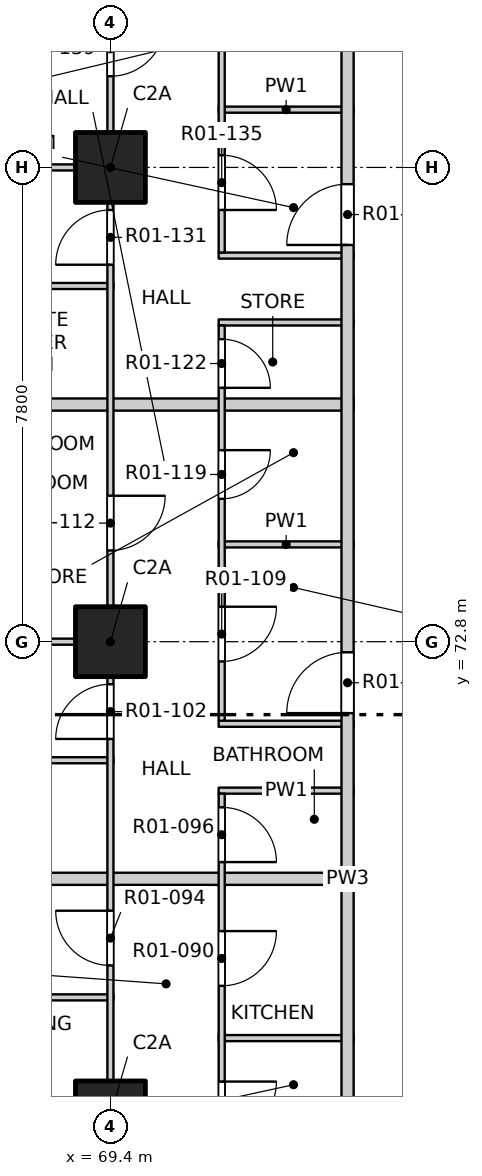
"""IFC4 building model, lengths in metres.
Left out: names, types, materials, properties, quantities, classifications, styles, units other than length and angle.
Written with IfcOpenShell. Run it as: python <this file> out.ifc"""

import sys

from ifc_helpers import new_model, si_unit, direction, frame, frame_2d, origin, origin_2d, place, context, subcontext, project, spatial, rectangle, extrude, element, fill, save


model = new_model("IFC4")
c1 = context("Model", 3, precision=1e-05, world=origin(), true_north=direction((0.0, 1.0)))
c2 = subcontext(c1, "Body", "Model", "MODEL_VIEW")
j1 = project(units=[si_unit("LENGTHUNIT", "METRE"), si_unit("PLANEANGLEUNIT", "RADIAN")], contexts=[c1])
p1 = place(None, origin())
s1 = spatial("IfcSite", under=j1, at=p1, CompositionType="ELEMENT")
p2 = place(p1, origin())
s2 = spatial("IfcBuilding", under=s1, at=p2, CompositionType="ELEMENT")
p3 = place(p2, frame((0.0, 0.0, 19.5)))
s3 = spatial("IfcBuildingStorey", under=s2, at=p3, CompositionType="ELEMENT", Elevation=19.5)
for number, where, z_axis, x_axis in (
    (1, (69.4, 65.0, -0.25), (0.0, 0.0, 1.0), (1.0, 0.0, 0.0)),
    (2, (69.4, 72.8, -0.25), (0.0, 0.0, 1.0), (1.0, 0.0, 0.0)),
    (3, (69.4, 80.6, -0.25), (0.0, 0.0, 1.0), (1.0, 0.0, 0.0)),
):
    element("IfcColumn", number, at=place(p3, frame(where, z_axis=z_axis, x_axis=x_axis)), inside=s3, PredefinedType="COLUMN", context=c2, shape_type="SweptSolid", body=[
        extrude(rectangle(XDim=1.15, YDim=1.15, at=origin_2d()), origin(), (0.0, 0.0, 1.0), 3.4),
    ])
p4 = place(p3, frame((71.18, 66.28, 0.0), z_axis=(0.0, 0.0, 1.0), x_axis=(1.0, 0.0, 0.0)))
e4 = element("IfcWall", 4, at=p4, inside=s3, PredefinedType="PARTITIONING", context=c2, shape_type="SweptSolid", body=[
    extrude(rectangle(XDim=2.22, YDim=0.1, at=frame_2d((1.11, 0.0))), origin(), (0.0, 0.0, 1.0), 3.15),
])
p5 = place(p3, frame((66.05, 66.95, 0.0), z_axis=(0.0, 0.0, 1.0), x_axis=(1.0, 0.0, 0.0)))
e5 = element("IfcWall", 5, at=p5, inside=s3, PredefinedType="PARTITIONING", context=c2, shape_type="SweptSolid", body=[
    extrude(rectangle(XDim=3.4, YDim=0.1, at=frame_2d((1.7, 0.0))), origin(), (0.0, 0.0, 1.0), 3.15),
])
p6 = place(p3, frame((61.9, 68.9, 0.0), z_axis=(0.0, 0.0, 1.0), x_axis=(1.0, 0.0, 0.0)))
e6 = element("IfcWall", 6, at=p6, inside=s3, PredefinedType="PARTITIONING", context=c2, shape_type="SweptSolid", body=[
    extrude(rectangle(XDim=11.5, YDim=0.2, at=frame_2d((5.75, 0.0))), origin(), (0.0, 0.0, 1.0), 3.15),
])
p7 = place(p3, frame((71.18, 70.35, 0.0), z_axis=(0.0, 0.0, 1.0), x_axis=(1.0, 0.0, 0.0)))
e7 = element("IfcWall", 7, at=p7, inside=s3, PredefinedType="PARTITIONING", context=c2, shape_type="SweptSolid", body=[
    extrude(rectangle(XDim=2.22, YDim=0.1, at=frame_2d((1.11, 0.0))), origin(), (0.0, 0.0, 1.0), 3.15),
])
p8 = place(p3, frame((65.75, 70.85, 0.0), z_axis=(0.0, 0.0, 1.0), x_axis=(1.0, 0.0, 0.0)))
e8 = element("IfcWall", 8, at=p8, inside=s3, PredefinedType="PARTITIONING", context=c2, shape_type="SweptSolid", body=[
    extrude(rectangle(XDim=3.7, YDim=0.1, at=frame_2d((1.85, 0.0))), origin(), (0.0, 0.0, 1.0), 3.15),
])
p9 = place(p3, frame((71.18, 71.45, 0.0), z_axis=(0.0, 0.0, 1.0), x_axis=(1.0, 0.0, 0.0)))
e9 = element("IfcWall", 9, at=p9, inside=s3, PredefinedType="PARTITIONING", context=c2, shape_type="SweptSolid", body=[
    extrude(rectangle(XDim=2.22, YDim=0.1, at=frame_2d((1.11, 0.0))), origin(), (0.0, 0.0, 1.0), 3.15),
])
p10 = place(p3, frame((61.9, 72.8, 0.0), z_axis=(0.0, 0.0, 1.0), x_axis=(1.0, 0.0, 0.0)))
e10 = element("IfcWall", 10, at=p10, inside=s3, PredefinedType="PARTITIONING", context=c2, shape_type="SweptSolid", body=[
    extrude(rectangle(XDim=7.55, YDim=0.1, at=frame_2d((3.775, 0.0))), origin(), (0.0, 0.0, 1.0), 2.55),
])
p11 = place(p3, frame((71.18, 74.4, 0.0), z_axis=(0.0, 0.0, 1.0), x_axis=(1.0, 0.0, 0.0)))
e11 = element("IfcWall", 11, at=p11, inside=s3, PredefinedType="PARTITIONING", context=c2, shape_type="SweptSolid", body=[
    extrude(rectangle(XDim=2.22, YDim=0.1, at=frame_2d((1.11, 0.0))), origin(), (0.0, 0.0, 1.0), 3.15),
])
p12 = place(p3, frame((61.9, 76.7, 0.0), z_axis=(0.0, 0.0, 1.0), x_axis=(1.0, 0.0, 0.0)))
e12 = element("IfcWall", 12, at=p12, inside=s3, PredefinedType="PARTITIONING", context=c2, shape_type="SweptSolid", body=[
    extrude(rectangle(XDim=11.5, YDim=0.2, at=frame_2d((5.75, 0.0))), origin(), (0.0, 0.0, 1.0), 3.15),
])
p13 = place(p3, frame((71.18, 78.05, 0.0), z_axis=(0.0, 0.0, 1.0), x_axis=(1.0, 0.0, 0.0)))
e13 = element("IfcWall", 13, at=p13, inside=s3, PredefinedType="PARTITIONING", context=c2, shape_type="SweptSolid", body=[
    extrude(rectangle(XDim=2.22, YDim=0.1, at=frame_2d((1.11, 0.0))), origin(), (0.0, 0.0, 1.0), 3.15),
])
p14 = place(p3, frame((65.9, 78.65, 0.0), z_axis=(0.0, 0.0, 1.0), x_axis=(1.0, 0.0, 0.0)))
e14 = element("IfcWall", 14, at=p14, inside=s3, PredefinedType="PARTITIONING", context=c2, shape_type="SweptSolid", body=[
    extrude(rectangle(XDim=3.55, YDim=0.1, at=frame_2d((1.775, 0.0))), origin(), (0.0, 0.0, 1.0), 3.15),
])
p15 = place(p3, frame((71.18, 79.15, 0.0), z_axis=(0.0, 0.0, 1.0), x_axis=(1.0, 0.0, 0.0)))
e15 = element("IfcWall", 15, at=p15, inside=s3, PredefinedType="PARTITIONING", context=c2, shape_type="SweptSolid", body=[
    extrude(rectangle(XDim=2.22, YDim=0.1, at=frame_2d((1.11, 0.0))), origin(), (0.0, 0.0, 1.0), 3.15),
])
p16 = place(p3, frame((61.9, 80.6, 0.0), z_axis=(0.0, 0.0, 1.0), x_axis=(1.0, 0.0, 0.0)))
e16 = element("IfcWall", 16, at=p16, inside=s3, PredefinedType="PARTITIONING", context=c2, shape_type="SweptSolid", body=[
    extrude(rectangle(XDim=7.55, YDim=0.1, at=frame_2d((3.775, 0.0))), origin(), (0.0, 0.0, 1.0), 2.55),
])
p17 = place(p3, frame((71.18, 81.55, 0.0), z_axis=(0.0, 0.0, 1.0), x_axis=(1.0, 0.0, 0.0)))
e17 = element("IfcWall", 17, at=p17, inside=s3, PredefinedType="PARTITIONING", context=c2, shape_type="SweptSolid", body=[
    extrude(rectangle(XDim=2.22, YDim=0.1, at=frame_2d((1.11, 0.0))), origin(), (0.0, 0.0, 1.0), 3.15),
])
p18 = place(p3, frame((69.4, 49.4, 0.0), z_axis=(0.0, 0.0, 1.0), x_axis=(0.0, 1.0, 0.0)))
e18 = element("IfcWall", 18, at=p18, inside=s3, PredefinedType="PARTITIONING", context=c2, shape_type="SweptSolid", body=[
    extrude(rectangle(XDim=31.2, YDim=0.1, at=frame_2d((15.6, 0.0))), origin(), (0.0, 0.0, 1.0), 3.15),
])
p19 = place(p18, frame((1.5, 0.0, 0.0)))
e19 = element("IfcOpeningElement", 19, at=p19, cuts=e18, PredefinedType="OPENING", context=c2, shape_type="SweptSolid", body=[
    extrude(rectangle(XDim=0.9, YDim=2.1, at=frame_2d((0.45, 1.05))), frame((0.0, 0.06, 0.0), z_axis=(0.0, -1.0, 0.0), x_axis=(1.0, 0.0, 0.0)), (0.0, 0.0, 1.0), 0.12),
])
p20 = place(p18, frame((6.225, 0.0, 0.0)))
e20 = element("IfcOpeningElement", 20, at=p20, cuts=e18, PredefinedType="OPENING", context=c2, shape_type="SweptSolid", body=[
    extrude(rectangle(XDim=0.9, YDim=2.1, at=frame_2d((0.45, 1.05))), frame((0.0, 0.06, 0.0), z_axis=(0.0, -1.0, 0.0), x_axis=(1.0, 0.0, 0.0)), (0.0, 0.0, 1.0), 0.12),
])
p21 = place(p18, frame((10.275, 0.0, 0.0)))
e21 = element("IfcOpeningElement", 21, at=p21, cuts=e18, PredefinedType="OPENING", context=c2, shape_type="SweptSolid", body=[
    extrude(rectangle(XDim=0.9, YDim=2.1, at=frame_2d((0.45, 1.05))), frame((0.0, 0.06, 0.0), z_axis=(0.0, -1.0, 0.0), x_axis=(1.0, 0.0, 0.0)), (0.0, 0.0, 1.0), 0.12),
])
p22 = place(p18, frame((13.2, 0.0, 0.0)))
e22 = element("IfcOpeningElement", 22, at=p22, cuts=e18, PredefinedType="OPENING", context=c2, shape_type="SweptSolid", body=[
    extrude(rectangle(XDim=0.9, YDim=2.1, at=frame_2d((0.45, 1.05))), frame((0.0, 0.06, 0.0), z_axis=(0.0, -1.0, 0.0), x_axis=(1.0, 0.0, 0.0)), (0.0, 0.0, 1.0), 0.12),
])
p23 = place(p18, frame((18.075, 0.0, 0.0)))
e23 = element("IfcOpeningElement", 23, at=p23, cuts=e18, PredefinedType="OPENING", context=c2, shape_type="SweptSolid", body=[
    extrude(rectangle(XDim=0.9, YDim=2.1, at=frame_2d((0.45, 1.05))), frame((0.0, 0.06, 0.0), z_axis=(0.0, -1.0, 0.0), x_axis=(1.0, 0.0, 0.0)), (0.0, 0.0, 1.0), 0.12),
])
p24 = place(p18, frame((21.8, 0.0, 0.0)))
e24 = element("IfcOpeningElement", 24, at=p24, cuts=e18, PredefinedType="OPENING", context=c2, shape_type="SweptSolid", body=[
    extrude(rectangle(XDim=0.9, YDim=2.1, at=frame_2d((0.45, 1.05))), frame((0.0, 0.06, 0.0), z_axis=(0.0, -1.0, 0.0), x_axis=(1.0, 0.0, 0.0)), (0.0, 0.0, 1.0), 0.12),
])
p25 = place(p18, frame((24.9, 0.0, 0.0)))
e25 = element("IfcOpeningElement", 25, at=p25, cuts=e18, PredefinedType="OPENING", context=c2, shape_type="SweptSolid", body=[
    extrude(rectangle(XDim=0.9, YDim=2.1, at=frame_2d((0.45, 1.05))), frame((0.0, 0.06, 0.0), z_axis=(0.0, -1.0, 0.0), x_axis=(1.0, 0.0, 0.0)), (0.0, 0.0, 1.0), 0.12),
])
p26 = place(p18, frame((29.6, 0.0, 0.0)))
e26 = element("IfcOpeningElement", 26, at=p26, cuts=e18, PredefinedType="OPENING", context=c2, shape_type="SweptSolid", body=[
    extrude(rectangle(XDim=0.9, YDim=2.1, at=frame_2d((0.45, 1.05))), frame((0.0, 0.06, 0.0), z_axis=(0.0, -1.0, 0.0), x_axis=(1.0, 0.0, 0.0)), (0.0, 0.0, 1.0), 0.12),
])
p27 = place(p3, frame((69.4, 80.6, 0.0), z_axis=(0.0, 0.0, 1.0), x_axis=(0.0, 1.0, 0.0)))
e27 = element("IfcWall", 27, at=p27, inside=s3, PredefinedType="PARTITIONING", context=c2, shape_type="SweptSolid", body=[
    extrude(rectangle(XDim=7.5, YDim=0.1, at=frame_2d((3.75, 0.0))), origin(), (0.0, 0.0, 1.0), 2.55),
])
p28 = place(p27, frame((1.5, 0.0, 0.0)))
e28 = element("IfcOpeningElement", 28, at=p28, cuts=e27, PredefinedType="OPENING", context=c2, shape_type="SweptSolid", body=[
    extrude(rectangle(XDim=0.9, YDim=2.1, at=frame_2d((0.45, 1.05))), frame((0.0, 0.06, 0.0), z_axis=(0.0, -1.0, 0.0), x_axis=(1.0, 0.0, 0.0)), (0.0, 0.0, 1.0), 0.12),
])
p29 = place(p27, frame((5.4, 0.0, 0.0)))
e29 = element("IfcOpeningElement", 29, at=p29, cuts=e27, PredefinedType="OPENING", context=c2, shape_type="SweptSolid", body=[
    extrude(rectangle(XDim=0.9, YDim=2.1, at=frame_2d((0.45, 1.05))), frame((0.0, 0.06, 0.0), z_axis=(0.0, -1.0, 0.0), x_axis=(1.0, 0.0, 0.0)), (0.0, 0.0, 1.0), 0.12),
])
p30 = place(p3, frame((71.23, 64.0, 0.0), z_axis=(0.0, 0.0, 1.0), x_axis=(0.0, 1.0, 0.0)))
e30 = element("IfcWall", 30, at=p30, inside=s3, PredefinedType="PARTITIONING", context=c2, shape_type="SweptSolid", body=[
    extrude(rectangle(XDim=6.3, YDim=0.1, at=frame_2d((3.15, 0.0))), origin(), (0.0, 0.0, 1.0), 3.15),
])
p31 = place(p30, frame((0.665, 0.0, 0.0)))
e31 = element("IfcOpeningElement", 31, at=p31, cuts=e30, PredefinedType="OPENING", context=c2, shape_type="SweptSolid", body=[
    extrude(rectangle(XDim=0.9, YDim=2.1, at=frame_2d((0.45, 1.05))), frame((0.0, 0.06, 0.0), z_axis=(0.0, -1.0, 0.0), x_axis=(1.0, 0.0, 0.0)), (0.0, 0.0, 1.0), 0.12),
])
p32 = place(p30, frame((3.14, 0.0, 0.0)))
e32 = element("IfcOpeningElement", 32, at=p32, cuts=e30, PredefinedType="OPENING", context=c2, shape_type="SweptSolid", body=[
    extrude(rectangle(XDim=0.9, YDim=2.1, at=frame_2d((0.45, 1.05))), frame((0.0, 0.06, 0.0), z_axis=(0.0, -1.0, 0.0), x_axis=(1.0, 0.0, 0.0)), (0.0, 0.0, 1.0), 0.12),
])
p33 = place(p30, frame((5.175, 0.0, 0.0)))
e33 = element("IfcOpeningElement", 33, at=p33, cuts=e30, PredefinedType="OPENING", context=c2, shape_type="SweptSolid", body=[
    extrude(rectangle(XDim=0.9, YDim=2.1, at=frame_2d((0.45, 1.05))), frame((0.0, 0.06, 0.0), z_axis=(0.0, -1.0, 0.0), x_axis=(1.0, 0.0, 0.0)), (0.0, 0.0, 1.0), 0.12),
])
p34 = place(p3, frame((71.23, 71.5, 0.0), z_axis=(0.0, 0.0, 1.0), x_axis=(0.0, 1.0, 0.0)))
e34 = element("IfcWall", 34, at=p34, inside=s3, PredefinedType="PARTITIONING", context=c2, shape_type="SweptSolid", body=[
    extrude(rectangle(XDim=6.5, YDim=0.1, at=frame_2d((3.25, 0.0))), origin(), (0.0, 0.0, 1.0), 3.15),
])
p35 = place(p34, frame((0.975, 0.0, 0.0)))
e35 = element("IfcOpeningElement", 35, at=p35, cuts=e34, PredefinedType="OPENING", context=c2, shape_type="SweptSolid", body=[
    extrude(rectangle(XDim=0.9, YDim=2.1, at=frame_2d((0.45, 1.05))), frame((0.0, 0.06, 0.0), z_axis=(0.0, -1.0, 0.0), x_axis=(1.0, 0.0, 0.0)), (0.0, 0.0, 1.0), 0.12),
])
p36 = place(p34, frame((3.65, 0.0, 0.0)))
e36 = element("IfcOpeningElement", 36, at=p36, cuts=e34, PredefinedType="OPENING", context=c2, shape_type="SweptSolid", body=[
    extrude(rectangle(XDim=0.8, YDim=2.1, at=frame_2d((0.4, 1.05))), frame((0.0, 0.06, 0.0), z_axis=(0.0, -1.0, 0.0), x_axis=(1.0, 0.0, 0.0)), (0.0, 0.0, 1.0), 0.12),
])
p37 = place(p34, frame((5.475, 0.0, 0.0)))
e37 = element("IfcOpeningElement", 37, at=p37, cuts=e34, PredefinedType="OPENING", context=c2, shape_type="SweptSolid", body=[
    extrude(rectangle(XDim=0.8, YDim=2.1, at=frame_2d((0.4, 1.05))), frame((0.0, 0.06, 0.0), z_axis=(0.0, -1.0, 0.0), x_axis=(1.0, 0.0, 0.0)), (0.0, 0.0, 1.0), 0.12),
])
p38 = place(p3, frame((71.23, 79.2, 0.0), z_axis=(0.0, 0.0, 1.0), x_axis=(0.0, 1.0, 0.0)))
e38 = element("IfcWall", 38, at=p38, inside=s3, PredefinedType="PARTITIONING", context=c2, shape_type="SweptSolid", body=[
    extrude(rectangle(XDim=5.25, YDim=0.1, at=frame_2d((2.625, 0.0))), origin(), (0.0, 0.0, 1.0), 3.15),
])
p39 = place(p38, frame((0.7, 0.0, 0.0)))
e39 = element("IfcOpeningElement", 39, at=p39, cuts=e38, PredefinedType="OPENING", context=c2, shape_type="SweptSolid", body=[
    extrude(rectangle(XDim=0.9, YDim=2.1, at=frame_2d((0.45, 1.05))), frame((0.0, 0.06, 0.0), z_axis=(0.0, -1.0, 0.0), x_axis=(1.0, 0.0, 0.0)), (0.0, 0.0, 1.0), 0.12),
])
p40 = place(p38, frame((3.375, 0.0, 0.0)))
e40 = element("IfcOpeningElement", 40, at=p40, cuts=e38, PredefinedType="OPENING", context=c2, shape_type="SweptSolid", body=[
    extrude(rectangle(XDim=0.9, YDim=2.1, at=frame_2d((0.45, 1.05))), frame((0.0, 0.06, 0.0), z_axis=(0.0, -1.0, 0.0), x_axis=(1.0, 0.0, 0.0)), (0.0, 0.0, 1.0), 0.12),
])
p41 = place(p3, frame((73.3, 53.4, 0.0), z_axis=(0.0, 0.0, 1.0), x_axis=(0.0, 1.0, 0.0)))
e41 = element("IfcWall", 41, at=p41, inside=s3, PredefinedType="PARTITIONING", context=c2, shape_type="SweptSolid", body=[
    extrude(rectangle(XDim=31.0, YDim=0.2, at=frame_2d((15.5, 0.0))), origin(), (0.0, 0.0, 1.0), 3.15),
])
p42 = place(p41, frame((2.325, 0.0, 0.0)))
e42 = element("IfcOpeningElement", 42, at=p42, cuts=e41, PredefinedType="OPENING", context=c2, shape_type="SweptSolid", body=[
    extrude(rectangle(XDim=1.0, YDim=2.1, at=frame_2d((0.5, 1.05))), frame((0.0, 0.11, 0.0), z_axis=(0.0, -1.0, 0.0), x_axis=(1.0, 0.0, 0.0)), (0.0, 0.0, 1.0), 0.22),
])
p43 = place(p41, frame((10.725, 0.0, 0.0)))
e43 = element("IfcOpeningElement", 43, at=p43, cuts=e41, PredefinedType="OPENING", context=c2, shape_type="SweptSolid", body=[
    extrude(rectangle(XDim=1.0, YDim=2.1, at=frame_2d((0.5, 1.05))), frame((0.0, 0.11, 0.0), z_axis=(0.0, -1.0, 0.0), x_axis=(1.0, 0.0, 0.0)), (0.0, 0.0, 1.0), 0.22),
])
p44 = place(p41, frame((18.225, 0.0, 0.0)))
e44 = element("IfcOpeningElement", 44, at=p44, cuts=e41, PredefinedType="OPENING", context=c2, shape_type="SweptSolid", body=[
    extrude(rectangle(XDim=1.0, YDim=2.1, at=frame_2d((0.5, 1.05))), frame((0.0, 0.11, 0.0), z_axis=(0.0, -1.0, 0.0), x_axis=(1.0, 0.0, 0.0)), (0.0, 0.0, 1.0), 0.22),
])
p45 = place(p41, frame((25.925, 0.0, 0.0)))
e45 = element("IfcOpeningElement", 45, at=p45, cuts=e41, PredefinedType="OPENING", context=c2, shape_type="SweptSolid", body=[
    extrude(rectangle(XDim=1.0, YDim=2.1, at=frame_2d((0.5, 1.05))), frame((0.0, 0.11, 0.0), z_axis=(0.0, -1.0, 0.0), x_axis=(1.0, 0.0, 0.0)), (0.0, 0.0, 1.0), 0.22),
])
p46 = place(p31, origin())
e46 = element("IfcDoor", 46, at=p46, inside=s3, OperationType="SINGLE_SWING_LEFT", PredefinedType="DOOR", context=c2, shape_type="SweptSolid", body=[
    extrude(rectangle(XDim=0.9, YDim=2.1, at=frame_2d((0.45, 1.05))), frame((0.0, 0.025, 0.0), z_axis=(0.0, -1.0, 0.0), x_axis=(1.0, 0.0, 0.0)), (0.0, 0.0, 1.0), 0.05),
])
fill(e31, e46)
p47 = place(p32, origin())
e47 = element("IfcDoor", 47, at=p47, inside=s3, OperationType="SINGLE_SWING_LEFT", PredefinedType="DOOR", context=c2, shape_type="SweptSolid", body=[
    extrude(rectangle(XDim=0.9, YDim=2.1, at=frame_2d((0.45, 1.05))), frame((0.0, 0.025, 0.0), z_axis=(0.0, -1.0, 0.0), x_axis=(1.0, 0.0, 0.0)), (0.0, 0.0, 1.0), 0.05),
])
fill(e32, e47)
p48 = place(p23, origin())
e48 = element("IfcDoor", 48, at=p48, inside=s3, OperationType="SINGLE_SWING_RIGHT", PredefinedType="DOOR", context=c2, shape_type="SweptSolid", body=[
    extrude(rectangle(XDim=0.9, YDim=2.1, at=frame_2d((0.45, 1.05))), frame((0.0, 0.025, 0.0), z_axis=(0.0, -1.0, 0.0), x_axis=(1.0, 0.0, 0.0)), (0.0, 0.0, 1.0), 0.05),
])
fill(e23, e48)
p49 = place(p33, origin())
e49 = element("IfcDoor", 49, at=p49, inside=s3, OperationType="SINGLE_SWING_RIGHT", PredefinedType="DOOR", context=c2, shape_type="SweptSolid", body=[
    extrude(rectangle(XDim=0.9, YDim=2.1, at=frame_2d((0.45, 1.05))), frame((0.0, 0.025, 0.0), z_axis=(0.0, -1.0, 0.0), x_axis=(1.0, 0.0, 0.0)), (0.0, 0.0, 1.0), 0.05),
])
fill(e33, e49)
p50 = place(p24, origin())
e50 = element("IfcDoor", 50, at=p50, inside=s3, OperationType="SINGLE_SWING_LEFT", PredefinedType="DOOR", context=c2, shape_type="SweptSolid", body=[
    extrude(rectangle(XDim=0.9, YDim=2.1, at=frame_2d((0.45, 1.05))), frame((0.0, 0.025, 0.0), z_axis=(0.0, -1.0, 0.0), x_axis=(1.0, 0.0, 0.0)), (0.0, 0.0, 1.0), 0.05),
])
fill(e24, e50)
p51 = place(p44, origin())
e51 = element("IfcDoor", 51, at=p51, inside=s3, OperationType="SINGLE_SWING_RIGHT", PredefinedType="DOOR", context=c2, shape_type="SweptSolid", body=[
    extrude(rectangle(XDim=1.0, YDim=2.1, at=frame_2d((0.5, 1.05))), frame((0.0, 0.025, 0.0), z_axis=(0.0, -1.0, 0.0), x_axis=(1.0, 0.0, 0.0)), (0.0, 0.0, 1.0), 0.05),
])
fill(e44, e51)
p52 = place(p35, origin())
e52 = element("IfcDoor", 52, at=p52, inside=s3, OperationType="SINGLE_SWING_LEFT", PredefinedType="DOOR", context=c2, shape_type="SweptSolid", body=[
    extrude(rectangle(XDim=0.9, YDim=2.1, at=frame_2d((0.45, 1.05))), frame((0.0, 0.025, 0.0), z_axis=(0.0, -1.0, 0.0), x_axis=(1.0, 0.0, 0.0)), (0.0, 0.0, 1.0), 0.05),
])
fill(e35, e52)
p53 = place(p25, origin())
e53 = element("IfcDoor", 53, at=p53, inside=s3, OperationType="SINGLE_SWING_LEFT", PredefinedType="DOOR", context=c2, shape_type="SweptSolid", body=[
    extrude(rectangle(XDim=0.9, YDim=2.1, at=frame_2d((0.45, 1.05))), frame((0.0, 0.025, 0.0), z_axis=(0.0, -1.0, 0.0), x_axis=(1.0, 0.0, 0.0)), (0.0, 0.0, 1.0), 0.05),
])
fill(e25, e53)
p54 = place(p36, origin())
e54 = element("IfcDoor", 54, at=p54, inside=s3, OperationType="SINGLE_SWING_LEFT", PredefinedType="DOOR", context=c2, shape_type="SweptSolid", body=[
    extrude(rectangle(XDim=0.8, YDim=2.1, at=frame_2d((0.4, 1.05))), frame((0.0, 0.025, 0.0), z_axis=(0.0, -1.0, 0.0), x_axis=(1.0, 0.0, 0.0)), (0.0, 0.0, 1.0), 0.05),
])
fill(e36, e54)
p55 = place(p37, origin())
e55 = element("IfcDoor", 55, at=p55, inside=s3, OperationType="SINGLE_SWING_RIGHT", PredefinedType="DOOR", context=c2, shape_type="SweptSolid", body=[
    extrude(rectangle(XDim=0.8, YDim=2.1, at=frame_2d((0.4, 1.05))), frame((0.0, 0.025, 0.0), z_axis=(0.0, -1.0, 0.0), x_axis=(1.0, 0.0, 0.0)), (0.0, 0.0, 1.0), 0.05),
])
fill(e37, e55)
p56 = place(p26, origin())
e56 = element("IfcDoor", 56, at=p56, inside=s3, OperationType="SINGLE_SWING_LEFT", PredefinedType="DOOR", context=c2, shape_type="SweptSolid", body=[
    extrude(rectangle(XDim=0.9, YDim=2.1, at=frame_2d((0.45, 1.05))), frame((0.0, 0.025, 0.0), z_axis=(0.0, -1.0, 0.0), x_axis=(1.0, 0.0, 0.0)), (0.0, 0.0, 1.0), 0.05),
])
fill(e26, e56)
p57 = place(p45, origin())
e57 = element("IfcDoor", 57, at=p57, inside=s3, OperationType="SINGLE_SWING_RIGHT", PredefinedType="DOOR", context=c2, shape_type="SweptSolid", body=[
    extrude(rectangle(XDim=1.0, YDim=2.1, at=frame_2d((0.5, 1.05))), frame((0.0, 0.025, 0.0), z_axis=(0.0, -1.0, 0.0), x_axis=(1.0, 0.0, 0.0)), (0.0, 0.0, 1.0), 0.05),
])
fill(e45, e57)
p58 = place(p39, origin())
e58 = element("IfcDoor", 58, at=p58, inside=s3, OperationType="SINGLE_SWING_RIGHT", PredefinedType="DOOR", context=c2, shape_type="SweptSolid", body=[
    extrude(rectangle(XDim=0.9, YDim=2.1, at=frame_2d((0.45, 1.05))), frame((0.0, 0.025, 0.0), z_axis=(0.0, -1.0, 0.0), x_axis=(1.0, 0.0, 0.0)), (0.0, 0.0, 1.0), 0.05),
])
fill(e39, e58)
p59 = place(p28, origin())
e59 = element("IfcDoor", 59, at=p59, inside=s3, OperationType="SINGLE_SWING_LEFT", PredefinedType="DOOR", context=c2, shape_type="SweptSolid", body=[
    extrude(rectangle(XDim=0.9, YDim=2.1, at=frame_2d((0.45, 1.05))), frame((0.0, 0.025, 0.0), z_axis=(0.0, -1.0, 0.0), x_axis=(1.0, 0.0, 0.0)), (0.0, 0.0, 1.0), 0.05),
])
fill(e28, e59)
save(model, sys.argv[1])
